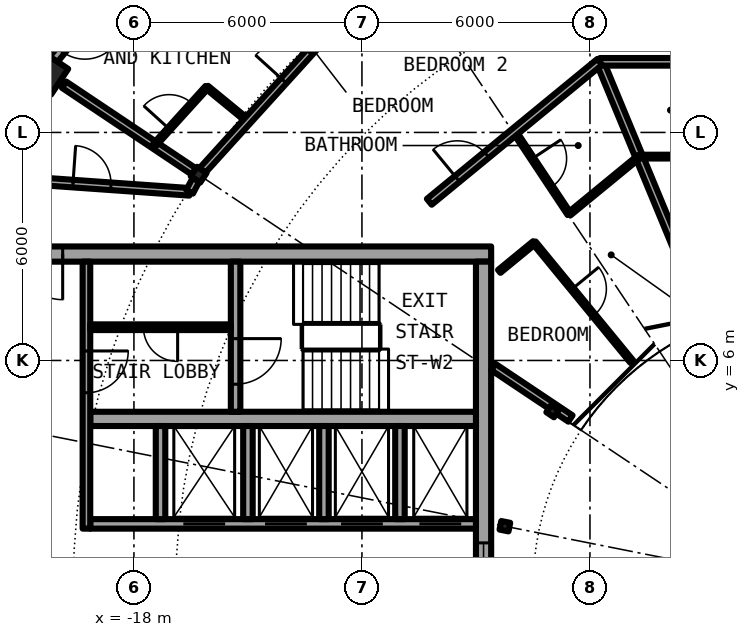
"""IFC4 building model, lengths in metres.
Left out: names, types, materials, properties, quantities, classifications, styles, units other than length and angle.
Written with IfcOpenShell. Run it as: python <this file> out.ifc"""

import sys

from ifc_helpers import new_model, si_unit, direction, frame, frame_2d, origin, origin_2d, place, context, subcontext, project, spatial, rectangle, hollow_circle, i_section, extrude, element, fill, save


model = new_model("IFC4")
c1 = context("Model", 3, precision=1e-05, world=origin(), true_north=direction((0.0, 1.0)))
c2 = subcontext(c1, "Body", "Model", "MODEL_VIEW")
j1 = project(units=[si_unit("LENGTHUNIT", "METRE"), si_unit("PLANEANGLEUNIT", "RADIAN")], contexts=[c1])
p1 = place(None, origin())
s1 = spatial("IfcSite", under=j1, at=p1, CompositionType="ELEMENT")
p2 = place(p1, origin())
s2 = spatial("IfcBuilding", under=s1, at=p2, CompositionType="ELEMENT")
p3 = place(p2, frame((0.0, 0.0, 243.2)))
s3 = spatial("IfcBuildingStorey", under=s2, at=p3, CompositionType="ELEMENT", Elevation=243.2)
p4 = place(p3, frame((-21.027, 14.05, 0.242), z_axis=(0.346875102267, -0.231750495433, 0.908828570905), x_axis=(0.555530396269, 0.831496228988, 0.0)))
e1 = element("IfcColumn", 1, at=p4, inside=s3, PredefinedType="COLUMN", context=c2, shape_type="SweptSolid", body=[
    extrude(hollow_circle(Radius=0.406, WallThickness=0.03, at=origin_2d()), origin(), (0.0, 0.0, 1.0), 3.09),
])
p5 = place(p3, frame((-16.297, 10.889, 0.0), z_axis=(0.0, 0.0, 1.0), x_axis=(-0.831469612303, 0.55557023302, 0.0)))
e2 = element("IfcColumn", 2, at=p5, inside=s3, PredefinedType="COLUMN", context=c2, shape_type="SweptSolid", body=[
    extrude(i_section(OverallWidth=0.3, OverallDepth=0.3, WebThickness=0.011, FlangeThickness=0.019, FilletRadius=0.027, at=origin_2d()), origin(), (0.0, 0.0, 1.0), 3.05),
])
for number, where, z_axis, x_axis in (
    (3, (-6.984, 4.667, 0.0), (0.0, 0.0, 1.0), (-0.831, 0.556, 0.0)),
    (4, (-8.239, 1.639, 0.0), (0.0, 0.0, 1.0), (-0.981, 0.195, 0.0)),
):
    element("IfcColumn", number, at=place(p3, frame(where, z_axis=z_axis, x_axis=x_axis)), inside=s3, PredefinedType="COLUMN", context=c2, shape_type="SweptSolid", body=[
        extrude(i_section(OverallWidth=0.24, OverallDepth=0.23, WebThickness=0.008, FlangeThickness=0.012, FilletRadius=0.021, at=origin_2d()), origin(), (0.0, 0.0, 1.0), 3.05),
    ])
p6 = place(p3, frame((-17.324, 17.324, 0.0), z_axis=(0.0, 0.0, 1.0), x_axis=(-0.634396836208, -0.773007538262, 0.0)))
e5 = element("IfcWall", 5, at=p6, inside=s3, PredefinedType="SOLIDWALL", context=c2, shape_type="SweptSolid", body=[
    extrude(rectangle(XDim=4.803, YDim=0.25, at=frame_2d((2.402, 0.0))), origin(), (0.0, 0.0, 1.0), 2.7),
])
p7 = place(p6, frame((0.304, 0.0, 0.3)))
e6 = element("IfcOpeningElement", 6, at=p7, cuts=e5, PredefinedType="OPENING", context=c2, shape_type="SweptSolid", body=[
    extrude(rectangle(XDim=1.8, YDim=2.1, at=frame_2d((0.9, 1.05))), frame((0.0, 0.135, 0.0), z_axis=(0.0, -1.0, 0.0), x_axis=(1.0, 0.0, 0.0)), (0.0, 0.0, 1.0), 0.27),
])
p8 = place(p6, frame((3.099, 0.0, 0.0)))
e7 = element("IfcOpeningElement", 7, at=p8, cuts=e5, PredefinedType="OPENING", context=c2, shape_type="SweptSolid", body=[
    extrude(rectangle(XDim=1.0, YDim=2.2, at=frame_2d((0.5, 1.1))), frame((0.0, 0.135, 0.0), z_axis=(0.0, -1.0, 0.0), x_axis=(1.0, 0.0, 0.0)), (0.0, 0.0, 1.0), 0.27),
])
p9 = place(p3, frame((-8.6, 8.8, 0.0), z_axis=(0.0, 0.0, 1.0), x_axis=(-1.0, 0.0, 0.0)))
e8 = element("IfcWall", 8, at=p9, inside=s3, PredefinedType="SHEAR", context=c2, shape_type="SweptSolid", body=[
    extrude(rectangle(XDim=13.4, YDim=0.4, at=frame_2d((6.7, 0.0))), origin(), (0.0, 0.0, 1.0), 3.05),
])
p10 = place(p9, frame((11.275, 0.0, 0.0)))
e9 = element("IfcOpeningElement", 9, at=p10, cuts=e8, PredefinedType="OPENING", context=c2, shape_type="SweptSolid", body=[
    extrude(rectangle(XDim=1.2, YDim=2.3, at=frame_2d((0.6, 1.15))), frame((0.0, 0.21, 0.0), z_axis=(0.0, -1.0, 0.0), x_axis=(1.0, 0.0, 0.0)), (0.0, 0.0, 1.0), 0.42),
])
p11 = place(p3, frame((-8.8, 8.6, 0.0), z_axis=(0.0, 0.0, 1.0), x_axis=(0.0, -1.0, 0.0)))
e10 = element("IfcWall", 10, at=p11, inside=s3, PredefinedType="SHEAR", context=c2, shape_type="SweptSolid", body=[
    extrude(rectangle(XDim=17.2, YDim=0.4, at=frame_2d((8.6, 0.0))), origin(), (0.0, 0.0, 1.0), 3.05),
])
p12 = place(p11, frame((7.4, 0.0, 0.1)))
e11 = element("IfcOpeningElement", 11, at=p12, cuts=e10, PredefinedType="OPENING", context=c2, shape_type="SweptSolid", body=[
    extrude(rectangle(XDim=2.4, YDim=2.2, at=frame_2d((1.2, 1.1))), frame((0.0, 0.21, 0.0), z_axis=(0.0, -1.0, 0.0), x_axis=(1.0, 0.0, 0.0)), (0.0, 0.0, 1.0), 0.42),
])
p13 = place(p3, frame((-9.0, 1.7, 0.0), z_axis=(0.0, 0.0, 1.0), x_axis=(-1.0, 0.0, 0.0)))
e12 = element("IfcWall", 12, at=p13, inside=s3, PredefinedType="SHEAR", context=c2, shape_type="SweptSolid", body=[
    extrude(rectangle(XDim=10.15, YDim=0.25, at=frame_2d((5.075, 0.0))), origin(), (0.0, 0.0, 1.0), 3.05),
])
p14 = place(p13, frame((0.387, 0.0, 0.0)))
e13 = element("IfcOpeningElement", 13, at=p14, cuts=e12, PredefinedType="OPENING", context=c2, shape_type="SweptSolid", body=[
    extrude(rectangle(XDim=1.1, YDim=2.3, at=frame_2d((0.55, 1.15))), frame((0.0, 0.135, 0.0), z_axis=(0.0, -1.0, 0.0), x_axis=(1.0, 0.0, 0.0)), (0.0, 0.0, 1.0), 0.27),
])
p15 = place(p13, frame((2.45, 0.0, 0.0)))
e14 = element("IfcOpeningElement", 14, at=p15, cuts=e12, PredefinedType="OPENING", context=c2, shape_type="SweptSolid", body=[
    extrude(rectangle(XDim=1.1, YDim=2.3, at=frame_2d((0.55, 1.15))), frame((0.0, 0.135, 0.0), z_axis=(0.0, -1.0, 0.0), x_axis=(1.0, 0.0, 0.0)), (0.0, 0.0, 1.0), 0.27),
])
p16 = place(p13, frame((4.45, 0.0, 0.0)))
e15 = element("IfcOpeningElement", 15, at=p16, cuts=e12, PredefinedType="OPENING", context=c2, shape_type="SweptSolid", body=[
    extrude(rectangle(XDim=1.1, YDim=2.3, at=frame_2d((0.55, 1.15))), frame((0.0, 0.135, 0.0), z_axis=(0.0, -1.0, 0.0), x_axis=(1.0, 0.0, 0.0)), (0.0, 0.0, 1.0), 0.27),
])
p17 = place(p13, frame((6.6, 0.0, 0.0)))
e16 = element("IfcOpeningElement", 16, at=p17, cuts=e12, PredefinedType="OPENING", context=c2, shape_type="SweptSolid", body=[
    extrude(rectangle(XDim=1.1, YDim=2.3, at=frame_2d((0.55, 1.15))), frame((0.0, 0.135, 0.0), z_axis=(0.0, -1.0, 0.0), x_axis=(1.0, 0.0, 0.0)), (0.0, 0.0, 1.0), 0.27),
])
p18 = place(p3, frame((-9.0, 4.462, 0.0), z_axis=(0.0, 0.0, 1.0), x_axis=(-1.0, 0.0, 0.0)))
e17 = element("IfcWall", 17, at=p18, inside=s3, PredefinedType="SHEAR", context=c2, shape_type="SweptSolid", body=[
    extrude(rectangle(XDim=10.15, YDim=0.375, at=frame_2d((5.075, 0.0))), origin(), (0.0, 0.0, 1.0), 3.05),
])
p19 = place(p3, frame((-15.325, 8.6, 0.0), z_axis=(0.0, 0.0, 1.0), x_axis=(0.0, -1.0, 0.0)))
e18 = element("IfcWall", 18, at=p19, inside=s3, PredefinedType="SHEAR", context=c2, shape_type="SweptSolid", body=[
    extrude(rectangle(XDim=3.95, YDim=0.25, at=frame_2d((1.975, 0.0))), origin(), (0.0, 0.0, 1.0), 3.05),
])
p20 = place(p19, frame((2.025, 0.0, 0.0)))
e19 = element("IfcOpeningElement", 19, at=p20, cuts=e18, PredefinedType="OPENING", context=c2, shape_type="SweptSolid", body=[
    extrude(rectangle(XDim=1.2, YDim=2.3, at=frame_2d((0.6, 1.15))), frame((0.0, 0.135, 0.0), z_axis=(0.0, -1.0, 0.0), x_axis=(1.0, 0.0, 0.0)), (0.0, 0.0, 1.0), 0.27),
])
for number, where, z_axis, x_axis in (
    (20, (-15.0, 1.825, 0.0), (0.0, 0.0, 1.0), (0.0, 1.0, 0.0)),
    (21, (-17.3, 1.825, 0.0), (0.0, 0.0, 1.0), (0.0, 1.0, 0.0)),
):
    element("IfcWall", number, at=place(p3, frame(where, z_axis=z_axis, x_axis=x_axis)), inside=s3, PredefinedType="SOLIDWALL", context=c2, shape_type="SweptSolid", body=[
        extrude(rectangle(XDim=2.45, YDim=0.25, at=frame_2d((1.225, 0.0))), origin(), (0.0, 0.0, 1.0), 2.7),
    ])
p21 = place(p3, frame((-19.25, 8.6, 0.0), z_axis=(0.0, 0.0, 1.0), x_axis=(0.0, -1.0, 0.0)))
e22 = element("IfcWall", 22, at=p21, inside=s3, PredefinedType="SOLIDWALL", context=c2, shape_type="SweptSolid", body=[
    extrude(rectangle(XDim=7.025, YDim=0.2, at=frame_2d((3.513, 0.0))), origin(), (0.0, 0.0, 1.0), 2.7),
])
p22 = place(p21, frame((2.35, 0.0, 0.0)))
e23 = element("IfcOpeningElement", 23, at=p22, cuts=e22, PredefinedType="OPENING", context=c2, shape_type="SweptSolid", body=[
    extrude(rectangle(XDim=1.1, YDim=2.3, at=frame_2d((0.55, 1.15))), frame((0.0, 0.11, 0.0), z_axis=(0.0, -1.0, 0.0), x_axis=(1.0, 0.0, 0.0)), (0.0, 0.0, 1.0), 0.22),
])
for number, where, z_axis, x_axis in (
    (24, (-11.0, 1.825, 0.0), (0.0, 0.0, 1.0), (0.0, 1.0, 0.0)),
    (25, (-13.0, 1.825, 0.0), (0.0, 0.0, 1.0), (0.0, 1.0, 0.0)),
):
    element("IfcWall", number, at=place(p3, frame(where, z_axis=z_axis, x_axis=x_axis)), inside=s3, PredefinedType="SOLIDWALL", context=c2, shape_type="SweptSolid", body=[
        extrude(rectangle(XDim=2.45, YDim=0.25, at=frame_2d((1.225, 0.0))), origin(), (0.0, 0.0, 1.0), 2.7),
    ])
p23 = place(p3, frame((-15.45, 6.875, 0.0), z_axis=(0.0, 0.0, 1.0), x_axis=(-1.0, 0.0, 0.0)))
e26 = element("IfcWall", 26, at=p23, inside=s3, PredefinedType="PARTITIONING", context=c2, shape_type="SweptSolid", body=[
    extrude(rectangle(XDim=3.7, YDim=0.15, at=frame_2d((1.85, 0.0))), origin(), (0.0, 0.0, 1.0), 2.7),
])
p24 = place(p23, frame((1.4, 0.0, 0.0)))
e27 = element("IfcOpeningElement", 27, at=p24, cuts=e26, PredefinedType="OPENING", context=c2, shape_type="SweptSolid", body=[
    extrude(rectangle(XDim=0.9, YDim=2.3, at=frame_2d((0.45, 1.15))), frame((0.0, 0.085, 0.0), z_axis=(0.0, -1.0, 0.0), x_axis=(1.0, 0.0, 0.0)), (0.0, 0.0, 1.0), 0.17),
])
p25 = place(p3, frame((-19.838, 13.256, 0.0), z_axis=(0.0, 0.0, 1.0), x_axis=(0.831263363926, -0.555878781566, 0.0)))
e28 = element("IfcWall", 28, at=p25, inside=s3, PredefinedType="PARTITIONING", context=c2, shape_type="SweptSolid", body=[
    extrude(rectangle(XDim=4.109, YDim=0.2, at=frame_2d((2.055, 0.0))), origin(), (0.0, 0.0, 1.0), 2.7),
])
p26 = place(p3, frame((-16.081, 13.189, 0.0), z_axis=(0.0, 0.0, 1.0), x_axis=(0.773321325714, -0.634014295735, 0.0)))
e29 = element("IfcWall", 29, at=p26, inside=s3, PredefinedType="PARTITIONING", context=c2, shape_type="SweptSolid", body=[
    extrude(rectangle(XDim=1.386, YDim=0.1, at=frame_2d((0.693, 0.0))), origin(), (0.0, 0.0, 1.0), 2.7),
])
p27 = place(p3, frame((-7.984, 12.017, 0.0), z_axis=(0.0, 0.0, 1.0), x_axis=(0.553289146762, -0.832989267683, 0.0)))
e30 = element("IfcWall", 30, at=p27, inside=s3, PredefinedType="PARTITIONING", context=c2, shape_type="SweptSolid", body=[
    extrude(rectangle(XDim=2.597, YDim=0.1, at=frame_2d((1.298, 0.0))), origin(), (0.0, 0.0, 1.0), 2.7),
])
p28 = place(p27, frame((0.848, 0.0, 0.0)))
e31 = element("IfcOpeningElement", 31, at=p28, cuts=e30, PredefinedType="OPENING", context=c2, shape_type="SweptSolid", body=[
    extrude(rectangle(XDim=0.9, YDim=2.3, at=frame_2d((0.45, 1.15))), frame((0.0, 0.06, 0.0), z_axis=(0.0, -1.0, 0.0), x_axis=(1.0, 0.0, 0.0)), (0.0, 0.0, 1.0), 0.12),
])
p29 = place(p3, frame((-7.467, 9.099, 0.0), z_axis=(0.0, 0.0, 1.0), x_axis=(0.634313840507, -0.773075644256, 0.0)))
e32 = element("IfcWall", 32, at=p29, inside=s3, PredefinedType="PARTITIONING", context=c2, shape_type="SweptSolid", body=[
    extrude(rectangle(XDim=4.05, YDim=0.1, at=frame_2d((2.025, 0.0))), origin(), (0.0, 0.0, 1.0), 2.7),
])
p30 = place(p29, frame((1.575, 0.0, 0.0)))
e33 = element("IfcOpeningElement", 33, at=p30, cuts=e32, PredefinedType="OPENING", context=c2, shape_type="SweptSolid", body=[
    extrude(rectangle(XDim=0.9, YDim=2.3, at=frame_2d((0.45, 1.15))), frame((0.0, 0.06, 0.0), z_axis=(0.0, -1.0, 0.0), x_axis=(1.0, 0.0, 0.0)), (0.0, 0.0, 1.0), 0.12),
])
p31 = place(p3, frame((-5.74, 13.858, 0.0), z_axis=(0.0, 0.0, 1.0), x_axis=(0.38267858248, -0.923881541385, 0.0)))
e34 = element("IfcWall", 34, at=p31, inside=s3, PredefinedType="PARTITIONING", context=c2, shape_type="SweptSolid", body=[
    extrude(rectangle(XDim=7.28, YDim=0.2, at=frame_2d((3.64, 0.0))), origin(), (0.0, 0.0, 1.0), 2.7),
])
p32 = place(p3, frame((-6.513, 4.472, 0.0), z_axis=(0.0, 0.0, 1.0), x_axis=(-0.831450132577, 0.555599385382, 0.0)))
e35 = element("IfcWall", 35, at=p32, inside=s3, PredefinedType="PARTITIONING", context=c2, shape_type="SweptSolid", body=[
    extrude(rectangle(XDim=2.443, YDim=0.2, at=frame_2d((1.221, 0.0))), origin(), (0.0, 0.0, 1.0), 2.7),
])
p33 = place(p3, frame((-21.675, 10.8, 0.0), z_axis=(0.0, 0.0, 1.0), x_axis=(0.997515141784, -0.070452408845, 0.0)))
e36 = element("IfcWall", 36, at=p33, inside=s3, PredefinedType="PARTITIONING", context=c2, shape_type="SweptSolid", body=[
    extrude(rectangle(XDim=5.153, YDim=0.2, at=frame_2d((2.576, 0.0))), origin(), (0.0, 0.0, 1.0), 2.7),
])
p34 = place(p33, frame((2.076, 0.0, 0.0)))
e37 = element("IfcOpeningElement", 37, at=p34, cuts=e36, PredefinedType="OPENING", context=c2, shape_type="SweptSolid", body=[
    extrude(rectangle(XDim=1.0, YDim=2.3, at=frame_2d((0.5, 1.15))), frame((0.0, 0.11, 0.0), z_axis=(0.0, -1.0, 0.0), x_axis=(1.0, 0.0, 0.0)), (0.0, 0.0, 1.0), 0.22),
])
p35 = place(p3, frame((-4.707, 11.364, 0.0), z_axis=(0.0, 0.0, 1.0), x_axis=(1.0, 0.0, 0.0)))
e38 = element("IfcWall", 38, at=p35, inside=s3, PredefinedType="PARTITIONING", context=c2, shape_type="SweptSolid", body=[
    extrude(rectangle(XDim=2.353, YDim=0.1, at=frame_2d((1.177, 0.0))), origin(), (0.0, 0.0, 1.0), 2.7),
])
p36 = place(p3, frame((-8.387, 8.344, 0.0), z_axis=(0.0, 0.0, 1.0), x_axis=(0.772869802794, 0.634564628646, 0.0)))
e39 = element("IfcWall", 39, at=p36, inside=s3, PredefinedType="PARTITIONING", context=c2, shape_type="SweptSolid", body=[
    extrude(rectangle(XDim=1.192, YDim=0.1, at=frame_2d((0.596, 0.0))), origin(), (0.0, 0.0, 1.0), 2.7),
])
p37 = place(p3, frame((-6.547, 9.854, 0.0), z_axis=(0.0, 0.0, 1.0), x_axis=(0.773033390712, 0.634365333893, 0.0)))
e40 = element("IfcWall", 40, at=p37, inside=s3, PredefinedType="PARTITIONING", context=c2, shape_type="SweptSolid", body=[
    extrude(rectangle(XDim=2.38, YDim=0.1, at=frame_2d((1.19, 0.0))), origin(), (0.0, 0.0, 1.0), 2.7),
])
p38 = place(p3, frame((-5.74, 13.858, 0.0), z_axis=(0.0, 0.0, 1.0), x_axis=(1.0, 0.0, 0.0)))
e41 = element("IfcWall", 41, at=p38, inside=s3, PredefinedType="PARTITIONING", context=c2, shape_type="SweptSolid", body=[
    extrude(rectangle(XDim=11.48, YDim=0.2, at=frame_2d((5.74, 0.0))), origin(), (0.0, 0.0, 1.0), 2.7),
])
p39 = place(p38, frame((3.805, 0.0, 0.0)))
e42 = element("IfcOpeningElement", 42, at=p39, cuts=e41, PredefinedType="OPENING", context=c2, shape_type="SweptSolid", body=[
    extrude(rectangle(XDim=1.0, YDim=2.3, at=frame_2d((0.5, 1.15))), frame((0.0, 0.11, 0.0), z_axis=(0.0, -1.0, 0.0), x_axis=(1.0, 0.0, 0.0)), (0.0, 0.0, 1.0), 0.22),
])
p40 = place(p3, frame((-10.228, 10.175, 0.0), z_axis=(0.0, 0.0, 1.0), x_axis=(0.772989261861, 0.634419105204, 0.0)))
e43 = element("IfcWall", 43, at=p40, inside=s3, PredefinedType="PARTITIONING", context=c2, shape_type="SweptSolid", body=[
    extrude(rectangle(XDim=5.803, YDim=0.2, at=frame_2d((2.902, 0.0))), origin(), (0.0, 0.0, 1.0), 2.7),
])
p41 = place(p40, frame((0.952, 0.0, 0.0)))
e44 = element("IfcOpeningElement", 44, at=p41, cuts=e43, PredefinedType="OPENING", context=c2, shape_type="SweptSolid", body=[
    extrude(rectangle(XDim=1.0, YDim=2.3, at=frame_2d((0.5, 1.15))), frame((0.0, 0.11, 0.0), z_axis=(0.0, -1.0, 0.0), x_axis=(1.0, 0.0, 0.0)), (0.0, 0.0, 1.0), 0.22),
])
p42 = place(p3, frame((-16.195, 11.002, 0.0), z_axis=(0.0, 0.0, 1.0), x_axis=(0.671619657805, 0.740896102871, 0.0)))
e45 = element("IfcWall", 45, at=p42, inside=s3, PredefinedType="PARTITIONING", context=c2, shape_type="SweptSolid", body=[
    extrude(rectangle(XDim=5.6, YDim=0.2, at=frame_2d((2.8, 0.0))), origin(), (0.0, 0.0, 1.0), 2.45),
])
p43 = place(p42, frame((3.183, 0.0, 0.0)))
e46 = element("IfcOpeningElement", 46, at=p43, cuts=e45, PredefinedType="OPENING", context=c2, shape_type="SweptSolid", body=[
    extrude(rectangle(XDim=1.0, YDim=2.3, at=frame_2d((0.5, 1.15))), frame((0.0, 0.11, 0.0), z_axis=(0.0, -1.0, 0.0), x_axis=(1.0, 0.0, 0.0)), (0.0, 0.0, 1.0), 0.22),
])
p44 = place(p3, frame((-16.535, 10.437, 0.0), z_axis=(0.0, 0.0, 1.0), x_axis=(0.465802239822, 0.884888848035, 0.0)))
e47 = element("IfcWall", 47, at=p44, inside=s3, PredefinedType="PARTITIONING", context=c2, shape_type="SweptSolid", body=[
    extrude(rectangle(XDim=0.361, YDim=0.2, at=frame_2d((0.18, 0.0))), origin(), (0.0, 0.0, 1.0), 2.7),
])
p45 = place(p3, frame((-17.461, 11.667, 0.0), z_axis=(0.0, 0.0, 1.0), x_axis=(0.671678456097, 0.74084279818, 0.0)))
e48 = element("IfcWall", 48, at=p45, inside=s3, PredefinedType="PARTITIONING", context=c2, shape_type="SweptSolid", body=[
    extrude(rectangle(XDim=2.054, YDim=0.1, at=frame_2d((1.027, 0.0))), origin(), (0.0, 0.0, 1.0), 2.7),
])
p46 = place(p45, frame((0.577, 0.0, 0.0)))
e49 = element("IfcOpeningElement", 49, at=p46, cuts=e48, PredefinedType="OPENING", context=c2, shape_type="SweptSolid", body=[
    extrude(rectangle(XDim=0.9, YDim=2.3, at=frame_2d((0.45, 1.15))), frame((0.0, 0.06, 0.0), z_axis=(0.0, -1.0, 0.0), x_axis=(1.0, 0.0, 0.0)), (0.0, 0.0, 1.0), 0.12),
])
p47 = place(p14, origin())
e50 = element("IfcDoor", 50, at=p47, inside=s3, OperationType="DOUBLE_DOOR_SLIDING", PredefinedType="DOOR", context=c2, shape_type="SweptSolid", body=[
    extrude(rectangle(XDim=1.1, YDim=2.3, at=frame_2d((0.55, 1.15))), frame((0.0, 0.025, 0.0), z_axis=(0.0, -1.0, 0.0), x_axis=(1.0, 0.0, 0.0)), (0.0, 0.0, 1.0), 0.05),
])
fill(e13, e50)
p48 = place(p15, origin())
e51 = element("IfcDoor", 51, at=p48, inside=s3, OperationType="DOUBLE_DOOR_SLIDING", PredefinedType="DOOR", context=c2, shape_type="SweptSolid", body=[
    extrude(rectangle(XDim=1.1, YDim=2.3, at=frame_2d((0.55, 1.15))), frame((0.0, 0.025, 0.0), z_axis=(0.0, -1.0, 0.0), x_axis=(1.0, 0.0, 0.0)), (0.0, 0.0, 1.0), 0.05),
])
fill(e14, e51)
p49 = place(p16, origin())
e52 = element("IfcDoor", 52, at=p49, inside=s3, OperationType="DOUBLE_DOOR_SLIDING", PredefinedType="DOOR", context=c2, shape_type="SweptSolid", body=[
    extrude(rectangle(XDim=1.1, YDim=2.3, at=frame_2d((0.55, 1.15))), frame((0.0, 0.025, 0.0), z_axis=(0.0, -1.0, 0.0), x_axis=(1.0, 0.0, 0.0)), (0.0, 0.0, 1.0), 0.05),
])
fill(e15, e52)
p50 = place(p17, origin())
e53 = element("IfcDoor", 53, at=p50, inside=s3, OperationType="DOUBLE_DOOR_SLIDING", PredefinedType="DOOR", context=c2, shape_type="SweptSolid", body=[
    extrude(rectangle(XDim=1.1, YDim=2.3, at=frame_2d((0.55, 1.15))), frame((0.0, 0.025, 0.0), z_axis=(0.0, -1.0, 0.0), x_axis=(1.0, 0.0, 0.0)), (0.0, 0.0, 1.0), 0.05),
])
fill(e16, e53)
p51 = place(p24, origin())
e54 = element("IfcDoor", 54, at=p51, inside=s3, OperationType="SINGLE_SWING_LEFT", PredefinedType="DOOR", context=c2, shape_type="SweptSolid", body=[
    extrude(rectangle(XDim=0.9, YDim=2.3, at=frame_2d((0.45, 1.15))), frame((0.0, 0.025, 0.0), z_axis=(0.0, -1.0, 0.0), x_axis=(1.0, 0.0, 0.0)), (0.0, 0.0, 1.0), 0.05),
])
fill(e27, e54)
p52 = place(p20, origin())
e55 = element("IfcDoor", 55, at=p52, inside=s3, OperationType="SINGLE_SWING_LEFT", PredefinedType="DOOR", context=c2, shape_type="SweptSolid", body=[
    extrude(rectangle(XDim=1.2, YDim=2.3, at=frame_2d((0.6, 1.15))), frame((0.0, 0.025, 0.0), z_axis=(0.0, -1.0, 0.0), x_axis=(1.0, 0.0, 0.0)), (0.0, 0.0, 1.0), 0.05),
])
fill(e19, e55)
p53 = place(p22, origin())
e56 = element("IfcDoor", 56, at=p53, inside=s3, OperationType="SINGLE_SWING_RIGHT", PredefinedType="DOOR", context=c2, shape_type="SweptSolid", body=[
    extrude(rectangle(XDim=1.1, YDim=2.3, at=frame_2d((0.55, 1.15))), frame((0.0, 0.025, 0.0), z_axis=(0.0, -1.0, 0.0), x_axis=(1.0, 0.0, 0.0)), (0.0, 0.0, 1.0), 0.05),
])
fill(e23, e56)
p54 = place(p10, origin())
e57 = element("IfcDoor", 57, at=p54, inside=s3, OperationType="SINGLE_SWING_LEFT", PredefinedType="DOOR", context=c2, shape_type="SweptSolid", body=[
    extrude(rectangle(XDim=1.2, YDim=2.3, at=frame_2d((0.6, 1.15))), frame((0.0, 0.025, 0.0), z_axis=(0.0, -1.0, 0.0), x_axis=(1.0, 0.0, 0.0)), (0.0, 0.0, 1.0), 0.05),
])
fill(e9, e57)
p55 = place(p12, origin())
e58 = element("IfcWindow", 58, at=p55, inside=s3, PartitioningType="SINGLE_PANEL", PredefinedType="WINDOW", context=c2, shape_type="SweptSolid", body=[
    extrude(rectangle(XDim=2.4, YDim=2.2, at=frame_2d((1.2, 1.1))), frame((0.0, 0.03, 0.0), z_axis=(0.0, -1.0, 0.0), x_axis=(1.0, 0.0, 0.0)), (0.0, 0.0, 1.0), 0.06),
])
fill(e11, e58)
p56 = place(p43, origin())
e59 = element("IfcDoor", 59, at=p56, inside=s3, OperationType="SINGLE_SWING_RIGHT", PredefinedType="DOOR", context=c2, shape_type="SweptSolid", body=[
    extrude(rectangle(XDim=1.0, YDim=2.3, at=frame_2d((0.5, 1.15))), frame((0.0, 0.025, 0.0), z_axis=(0.0, -1.0, 0.0), x_axis=(1.0, 0.0, 0.0)), (0.0, 0.0, 1.0), 0.05),
])
fill(e46, e59)
p57 = place(p46, origin())
e60 = element("IfcDoor", 60, at=p57, inside=s3, OperationType="SINGLE_SWING_LEFT", PredefinedType="DOOR", context=c2, shape_type="SweptSolid", body=[
    extrude(rectangle(XDim=0.9, YDim=2.3, at=frame_2d((0.45, 1.15))), frame((0.0, 0.025, 0.0), z_axis=(0.0, -1.0, 0.0), x_axis=(1.0, 0.0, 0.0)), (0.0, 0.0, 1.0), 0.05),
])
fill(e49, e60)
p58 = place(p41, origin())
e61 = element("IfcDoor", 61, at=p58, inside=s3, OperationType="SINGLE_SWING_LEFT", PredefinedType="DOOR", context=c2, shape_type="SweptSolid", body=[
    extrude(rectangle(XDim=1.0, YDim=2.3, at=frame_2d((0.5, 1.15))), frame((0.0, 0.025, 0.0), z_axis=(0.0, -1.0, 0.0), x_axis=(1.0, 0.0, 0.0)), (0.0, 0.0, 1.0), 0.05),
])
fill(e44, e61)
p59 = place(p28, origin())
e62 = element("IfcDoor", 62, at=p59, inside=s3, OperationType="SINGLE_SWING_RIGHT", PredefinedType="DOOR", context=c2, shape_type="SweptSolid", body=[
    extrude(rectangle(XDim=0.9, YDim=2.3, at=frame_2d((0.45, 1.15))), frame((0.0, 0.025, 0.0), z_axis=(0.0, -1.0, 0.0), x_axis=(1.0, 0.0, 0.0)), (0.0, 0.0, 1.0), 0.05),
])
fill(e31, e62)
p60 = place(p30, origin())
e63 = element("IfcDoor", 63, at=p60, inside=s3, OperationType="SINGLE_SWING_RIGHT", PredefinedType="DOOR", context=c2, shape_type="SweptSolid", body=[
    extrude(rectangle(XDim=0.9, YDim=2.3, at=frame_2d((0.45, 1.15))), frame((0.0, 0.025, 0.0), z_axis=(0.0, -1.0, 0.0), x_axis=(1.0, 0.0, 0.0)), (0.0, 0.0, 1.0), 0.05),
])
fill(e33, e63)
p61 = place(p34, origin())
e64 = element("IfcDoor", 64, at=p61, inside=s3, OperationType="SINGLE_SWING_RIGHT", PredefinedType="DOOR", context=c2, shape_type="SweptSolid", body=[
    extrude(rectangle(XDim=1.0, YDim=2.3, at=frame_2d((0.5, 1.15))), frame((0.0, 0.025, 0.0), z_axis=(0.0, -1.0, 0.0), x_axis=(1.0, 0.0, 0.0)), (0.0, 0.0, 1.0), 0.05),
])
fill(e37, e64)
save(model, sys.argv[1])
